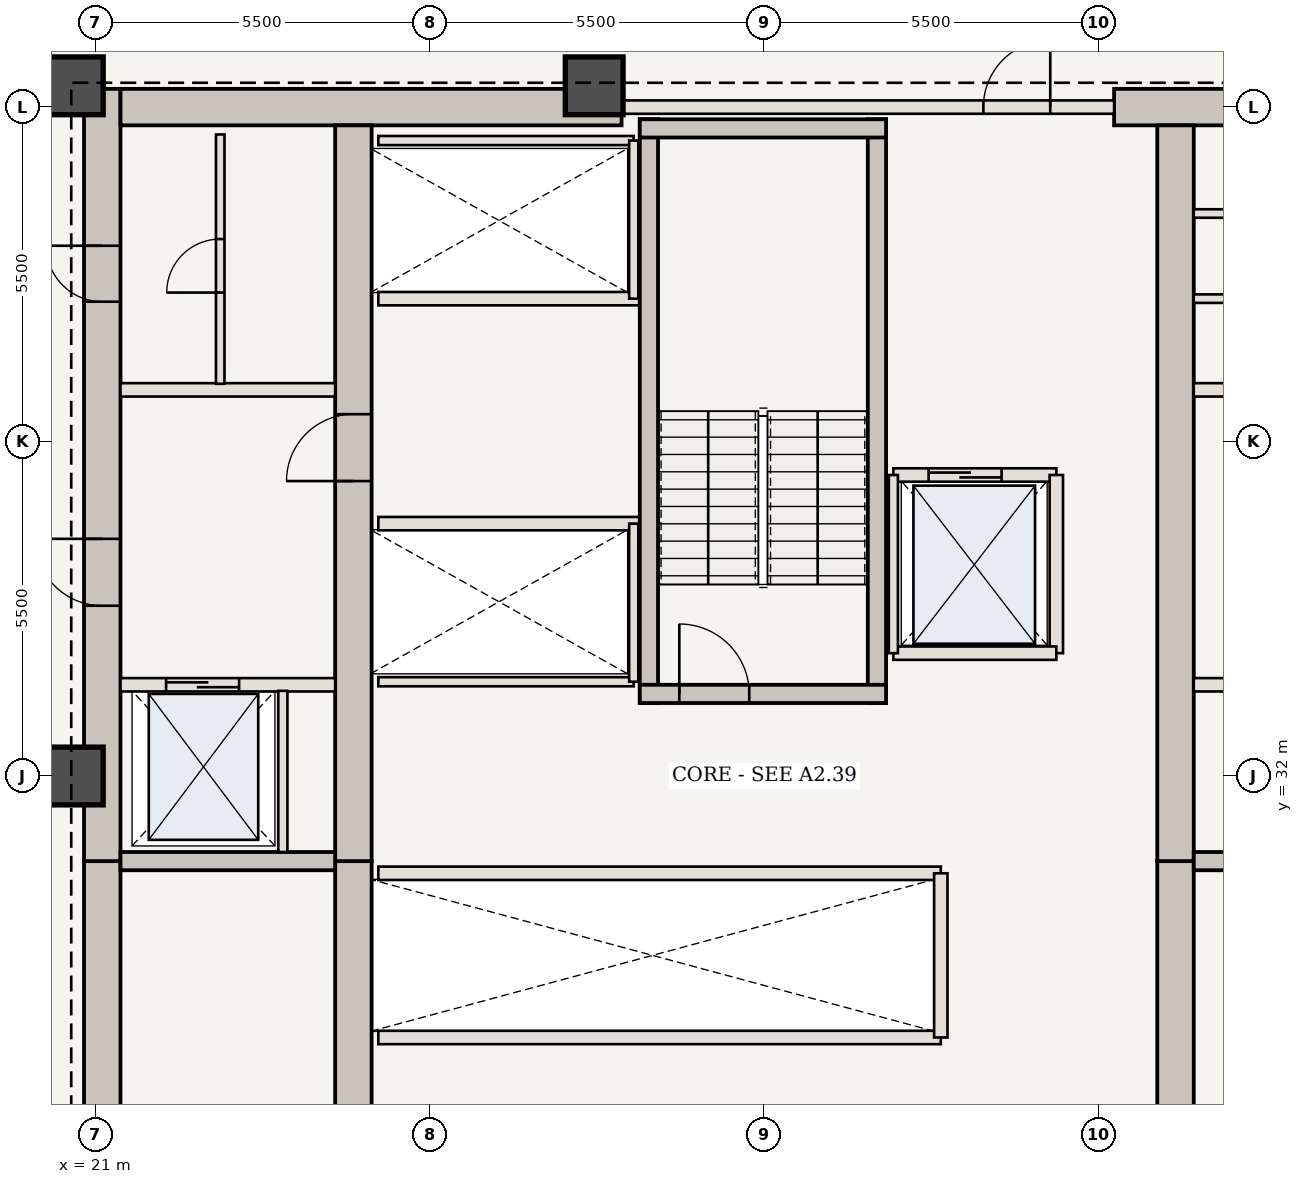
"""IFC4 building model, lengths in metres.
Left out: names, types, materials, properties, quantities, classifications, styles, units other than length and angle.
Written with IfcOpenShell. Run it as: python <this file> out.ifc"""

import sys

from ifc_helpers import new_model, si_unit, direction, frame, frame_2d, origin, origin_2d, place, context, subcontext, project, spatial, rectangle, extrude, element, fill, save


model = new_model("IFC4")
c1 = context("Model", 3, precision=1e-05, world=origin(), true_north=direction((0.0, 1.0)))
c2 = subcontext(c1, "Body", "Model", "MODEL_VIEW")
j1 = project(units=[si_unit("LENGTHUNIT", "METRE"), si_unit("PLANEANGLEUNIT", "RADIAN")], contexts=[c1])
p1 = place(None, origin())
s1 = spatial("IfcSite", under=j1, at=p1, CompositionType="ELEMENT")
p2 = place(p1, origin())
s2 = spatial("IfcBuilding", under=s1, at=p2, CompositionType="ELEMENT")
p3 = place(p2, frame((0.0, 0.0, 172.2)))
s3 = spatial("IfcBuildingStorey", under=s2, at=p3, CompositionType="ELEMENT", Elevation=172.2)
p4 = place(p3, frame((21.11, 20.65, 0.0), z_axis=(0.0, 0.0, 1.0), x_axis=(0.0, 1.0, 0.0)))
e1 = element("IfcWall", 1, at=p4, inside=s3, PredefinedType="SHEAR", context=c2, shape_type="SweptSolid", body=[
    extrude(rectangle(XDim=9.95, YDim=0.6, at=frame_2d((4.975, 0.0))), origin(), (0.0, 0.0, 1.0), 3.85),
])
p5 = place(p4, frame((1.1, 0.0, 0.0)))
e2 = element("IfcOpeningElement", 2, at=p5, cuts=e1, PredefinedType="OPENING", context=c2, shape_type="SweptSolid", body=[
    extrude(rectangle(XDim=1.15, YDim=2.15, at=frame_2d((0.575, 1.075))), frame((0.0, 0.31, 0.0), z_axis=(0.0, -1.0, 0.0), x_axis=(1.0, 0.0, 0.0)), (0.0, 0.0, 1.0), 0.62),
])
p6 = place(p3, frame((21.11, 30.6, 0.0), z_axis=(0.0, 0.0, 1.0), x_axis=(0.0, 1.0, 0.0)))
e3 = element("IfcWall", 3, at=p6, inside=s3, PredefinedType="SHEAR", context=c2, shape_type="SweptSolid", body=[
    extrude(rectangle(XDim=12.7, YDim=0.6, at=frame_2d((6.35, 0.0))), origin(), (0.0, 0.0, 1.0), 3.85),
])
p7 = place(p6, frame((4.2, 0.0, 0.0)))
e4 = element("IfcOpeningElement", 4, at=p7, cuts=e3, PredefinedType="OPENING", context=c2, shape_type="SweptSolid", body=[
    extrude(rectangle(XDim=1.1, YDim=2.15, at=frame_2d((0.55, 1.075))), frame((0.0, 0.31, 0.0), z_axis=(0.0, -1.0, 0.0), x_axis=(1.0, 0.0, 0.0)), (0.0, 0.0, 1.0), 0.62),
])
p8 = place(p6, frame((9.2, 0.0, 0.0)))
e5 = element("IfcOpeningElement", 5, at=p8, cuts=e3, PredefinedType="OPENING", context=c2, shape_type="SweptSolid", body=[
    extrude(rectangle(XDim=0.92, YDim=2.1, at=frame_2d((0.46, 1.05))), frame((0.0, 0.31, 0.0), z_axis=(0.0, -1.0, 0.0), x_axis=(1.0, 0.0, 0.0)), (0.0, 0.0, 1.0), 0.62),
])
p9 = place(p3, frame((21.41, 43.0, 0.0), z_axis=(0.0, 0.0, 1.0), x_axis=(1.0, 0.0, 0.0)))
e6 = element("IfcWall", 6, at=p9, inside=s3, PredefinedType="SHEAR", context=c2, shape_type="SweptSolid", body=[
    extrude(rectangle(XDim=8.24, YDim=0.6, at=frame_2d((4.12, 0.0))), origin(), (0.0, 0.0, 1.0), 3.85),
])
p10 = place(p3, frame((37.75, 43.0, 0.0), z_axis=(0.0, 0.0, 1.0), x_axis=(1.0, 0.0, 0.0)))
e7 = element("IfcWall", 7, at=p10, inside=s3, PredefinedType="SHEAR", context=c2, shape_type="SweptSolid", body=[
    extrude(rectangle(XDim=4.84, YDim=0.6, at=frame_2d((2.42, 0.0))), origin(), (0.0, 0.0, 1.0), 3.85),
])
p11 = place(p3, frame((25.24, 21.25, 0.0), z_axis=(0.0, 0.0, 1.0), x_axis=(0.0, 1.0, 0.0)))
e8 = element("IfcWall", 8, at=p11, inside=s3, PredefinedType="SHEAR", context=c2, shape_type="SweptSolid", body=[
    extrude(rectangle(XDim=9.35, YDim=0.6, at=frame_2d((4.675, 0.0))), origin(), (0.0, 0.0, 1.0), 3.85),
])
p12 = place(p3, frame((25.24, 30.6, 0.0), z_axis=(0.0, 0.0, 1.0), x_axis=(0.0, 1.0, 0.0)))
e9 = element("IfcWall", 9, at=p12, inside=s3, PredefinedType="SHEAR", context=c2, shape_type="SweptSolid", body=[
    extrude(rectangle(XDim=12.1, YDim=0.6, at=frame_2d((6.05, 0.0))), origin(), (0.0, 0.0, 1.0), 3.85),
])
p13 = place(p12, frame((6.25, 0.0, 0.0)))
e10 = element("IfcOpeningElement", 10, at=p13, cuts=e9, PredefinedType="OPENING", context=c2, shape_type="SweptSolid", body=[
    extrude(rectangle(XDim=1.1, YDim=2.15, at=frame_2d((0.55, 1.075))), frame((0.0, 0.31, 0.0), z_axis=(0.0, -1.0, 0.0), x_axis=(1.0, 0.0, 0.0)), (0.0, 0.0, 1.0), 0.62),
])
p14 = place(p3, frame((38.76, 21.25, 0.0), z_axis=(0.0, 0.0, 1.0), x_axis=(0.0, 1.0, 0.0)))
e11 = element("IfcWall", 11, at=p14, inside=s3, PredefinedType="SHEAR", context=c2, shape_type="SweptSolid", body=[
    extrude(rectangle(XDim=9.35, YDim=0.6, at=frame_2d((4.675, 0.0))), origin(), (0.0, 0.0, 1.0), 3.85),
])
p15 = place(p3, frame((38.76, 30.6, 0.0), z_axis=(0.0, 0.0, 1.0), x_axis=(0.0, 1.0, 0.0)))
e12 = element("IfcWall", 12, at=p15, inside=s3, PredefinedType="SHEAR", context=c2, shape_type="SweptSolid", body=[
    extrude(rectangle(XDim=12.1, YDim=0.6, at=frame_2d((6.05, 0.0))), origin(), (0.0, 0.0, 1.0), 3.85),
])
for number, where, z_axis, x_axis in (
    (13, (29.2, 43.35, 0.0), (0.0, 0.0, 1.0), (1.0, 0.0, 0.0)),
    (14, (20.65, 43.35, 0.0), (0.0, 0.0, 1.0), (1.0, 0.0, 0.0)),
    (15, (20.65, 32.0, 0.0), (0.0, 0.0, 1.0), (1.0, 0.0, 0.0)),
):
    element("IfcColumn", number, at=place(p3, frame(where, z_axis=z_axis, x_axis=x_axis)), inside=s3, PredefinedType="COLUMN", context=c2, shape_type="SweptSolid", body=[
        extrude(rectangle(XDim=0.95, YDim=0.95, at=origin_2d()), origin(), (0.0, 0.0, 1.0), 3.85),
    ])
for number, where, z_axis, x_axis in (
    (16, (21.41, 30.6, 0.0), (0.0, 0.0, 1.0), (1.0, 0.0, 0.0)),
    (17, (39.06, 30.6, 0.0), (0.0, 0.0, 1.0), (1.0, 0.0, 0.0)),
):
    element("IfcWall", number, at=place(p3, frame(where, z_axis=z_axis, x_axis=x_axis)), inside=s3, PredefinedType="SHEAR", context=c2, shape_type="SweptSolid", body=[
        extrude(rectangle(XDim=3.53, YDim=0.3, at=frame_2d((1.765, 0.0))), origin(), (0.0, 0.0, 1.0), 3.43),
    ])
p16 = place(p3, frame((21.41, 33.5, 0.0), z_axis=(0.0, 0.0, 1.0), x_axis=(1.0, 0.0, 0.0)))
e18 = element("IfcWall", 18, at=p16, inside=s3, PredefinedType="STANDARD", context=c2, shape_type="SweptSolid", body=[
    extrude(rectangle(XDim=3.53, YDim=0.22, at=frame_2d((1.765, 0.0))), origin(), (0.0, 0.0, 1.0), 3.43),
])
p17 = place(p16, frame((0.75, 0.0, 0.0)))
e19 = element("IfcOpeningElement", 19, at=p17, cuts=e18, PredefinedType="OPENING", context=c2, shape_type="SweptSolid", body=[
    extrude(rectangle(XDim=1.2, YDim=2.2, at=frame_2d((0.6, 1.1))), frame((0.0, 0.12, 0.0), z_axis=(0.0, -1.0, 0.0), x_axis=(1.0, 0.0, 0.0)), (0.0, 0.0, 1.0), 0.24),
])
p18 = place(p3, frame((24.08, 30.75, 0.0), z_axis=(0.0, 0.0, 1.0), x_axis=(0.0, 1.0, 0.0)))
e20 = element("IfcWall", 20, at=p18, inside=s3, PredefinedType="STANDARD", context=c2, shape_type="SweptSolid", body=[
    extrude(rectangle(XDim=2.65, YDim=0.15, at=frame_2d((1.325, 0.0))), origin(), (0.0, 0.0, 1.0), 3.43),
])
p19 = place(p3, frame((39.06, 33.5, 0.0), z_axis=(0.0, 0.0, 1.0), x_axis=(1.0, 0.0, 0.0)))
e21 = element("IfcWall", 21, at=p19, inside=s3, PredefinedType="STANDARD", context=c2, shape_type="SweptSolid", body=[
    extrude(rectangle(XDim=3.53, YDim=0.22, at=frame_2d((1.765, 0.0))), origin(), (0.0, 0.0, 1.0), 3.43),
])
p20 = place(p19, frame((1.55, 0.0, 0.0)))
e22 = element("IfcOpeningElement", 22, at=p20, cuts=e21, PredefinedType="OPENING", context=c2, shape_type="SweptSolid", body=[
    extrude(rectangle(XDim=1.2, YDim=2.2, at=frame_2d((0.6, 1.1))), frame((0.0, 0.12, 0.0), z_axis=(0.0, -1.0, 0.0), x_axis=(1.0, 0.0, 0.0)), (0.0, 0.0, 1.0), 0.24),
])
for number, where, z_axis, x_axis in (
    (23, (21.41, 38.35, 0.0), (0.0, 0.0, 1.0), (1.0, 0.0, 0.0)),
    (24, (39.06, 38.35, 0.0), (0.0, 0.0, 1.0), (1.0, 0.0, 0.0)),
):
    element("IfcWall", number, at=place(p3, frame(where, z_axis=z_axis, x_axis=x_axis)), inside=s3, PredefinedType="STANDARD", context=c2, shape_type="SweptSolid", body=[
        extrude(rectangle(XDim=3.53, YDim=0.22, at=frame_2d((1.765, 0.0))), origin(), (0.0, 0.0, 1.0), 3.43),
    ])
p21 = place(p3, frame((23.05, 38.45, 0.0), z_axis=(0.0, 0.0, 1.0), x_axis=(0.0, 1.0, 0.0)))
e25 = element("IfcWall", 25, at=p21, inside=s3, PredefinedType="STANDARD", context=c2, shape_type="SweptSolid", body=[
    extrude(rectangle(XDim=4.1, YDim=0.14, at=frame_2d((2.05, 0.0))), origin(), (0.0, 0.0, 1.0), 3.43),
])
p22 = place(p21, frame((1.5, 0.0, 0.0)))
e26 = element("IfcOpeningElement", 26, at=p22, cuts=e25, PredefinedType="OPENING", context=c2, shape_type="SweptSolid", body=[
    extrude(rectangle(XDim=0.88, YDim=2.1, at=frame_2d((0.44, 1.05))), frame((0.0, 0.08, 0.0), z_axis=(0.0, -1.0, 0.0), x_axis=(1.0, 0.0, 0.0)), (0.0, 0.0, 1.0), 0.16),
])
for number, where, z_axis, x_axis in (
    (27, (39.06, 39.85, 0.0), (0.0, 0.0, 1.0), (1.0, 0.0, 0.0)),
    (28, (39.06, 41.25, 0.0), (0.0, 0.0, 1.0), (1.0, 0.0, 0.0)),
):
    element("IfcWall", number, at=place(p3, frame(where, z_axis=z_axis, x_axis=x_axis)), inside=s3, PredefinedType="STANDARD", context=c2, shape_type="SweptSolid", body=[
        extrude(rectangle(XDim=3.53, YDim=0.14, at=frame_2d((1.765, 0.0))), origin(), (0.0, 0.0, 1.0), 3.43),
    ])
for number, where, z_axis, x_axis in (
    (29, (25.65, 27.7, 0.0), (0.0, 0.0, 1.0), (1.0, 0.0, 0.0)),
    (30, (25.65, 30.4, 0.0), (0.0, 0.0, 1.0), (1.0, 0.0, 0.0)),
):
    element("IfcWall", number, at=place(p3, frame(where, z_axis=z_axis, x_axis=x_axis)), inside=s3, PredefinedType="STANDARD", context=c2, shape_type="SweptSolid", body=[
        extrude(rectangle(XDim=9.25, YDim=0.22, at=frame_2d((4.625, 0.0))), origin(), (0.0, 0.0, 1.0), 3.43),
    ])
p23 = place(p3, frame((34.9, 27.7, 0.0), z_axis=(0.0, 0.0, 1.0), x_axis=(0.0, 1.0, 0.0)))
e31 = element("IfcWall", 31, at=p23, inside=s3, PredefinedType="STANDARD", context=c2, shape_type="SweptSolid", body=[
    extrude(rectangle(XDim=2.7, YDim=0.22, at=frame_2d((1.35, 0.0))), origin(), (0.0, 0.0, 1.0), 3.43),
])
p24 = place(p3, frame((25.65, 36.15, 0.0), z_axis=(0.0, 0.0, 1.0), x_axis=(1.0, 0.0, 0.0)))
e32 = element("IfcWall", 32, at=p24, inside=s3, PredefinedType="STANDARD", context=c2, shape_type="SweptSolid", body=[
    extrude(rectangle(XDim=4.3, YDim=0.22, at=frame_2d((2.15, 0.0))), origin(), (0.0, 0.0, 1.0), 3.43),
])
p25 = place(p3, frame((25.65, 33.55, 0.0), z_axis=(0.0, 0.0, 1.0), x_axis=(1.0, 0.0, 0.0)))
e33 = element("IfcWall", 33, at=p25, inside=s3, PredefinedType="STANDARD", context=c2, shape_type="SweptSolid", body=[
    extrude(rectangle(XDim=4.2, YDim=0.15, at=frame_2d((2.1, 0.0))), origin(), (0.0, 0.0, 1.0), 3.43),
])
p26 = place(p3, frame((29.85, 33.55, 0.0), z_axis=(0.0, 0.0, 1.0), x_axis=(0.0, 1.0, 0.0)))
e34 = element("IfcWall", 34, at=p26, inside=s3, PredefinedType="STANDARD", context=c2, shape_type="SweptSolid", body=[
    extrude(rectangle(XDim=2.6, YDim=0.15, at=frame_2d((1.3, 0.0))), origin(), (0.0, 0.0, 1.0), 3.43),
])
p27 = place(p3, frame((25.65, 39.85, 0.0), z_axis=(0.0, 0.0, 1.0), x_axis=(1.0, 0.0, 0.0)))
e35 = element("IfcWall", 35, at=p27, inside=s3, PredefinedType="STANDARD", context=c2, shape_type="SweptSolid", body=[
    extrude(rectangle(XDim=4.3, YDim=0.22, at=frame_2d((2.15, 0.0))), origin(), (0.0, 0.0, 1.0), 3.43),
])
p28 = place(p3, frame((25.65, 42.45, 0.0), z_axis=(0.0, 0.0, 1.0), x_axis=(1.0, 0.0, 0.0)))
e36 = element("IfcWall", 36, at=p28, inside=s3, PredefinedType="STANDARD", context=c2, shape_type="SweptSolid", body=[
    extrude(rectangle(XDim=4.2, YDim=0.15, at=frame_2d((2.1, 0.0))), origin(), (0.0, 0.0, 1.0), 3.43),
])
p29 = place(p3, frame((29.85, 39.85, 0.0), z_axis=(0.0, 0.0, 1.0), x_axis=(0.0, 1.0, 0.0)))
e37 = element("IfcWall", 37, at=p29, inside=s3, PredefinedType="STANDARD", context=c2, shape_type="SweptSolid", body=[
    extrude(rectangle(XDim=2.6, YDim=0.15, at=frame_2d((1.3, 0.0))), origin(), (0.0, 0.0, 1.0), 3.43),
])
for number, where, z_axis, x_axis in (
    (38, (30.1, 33.2, 0.0), (0.0, 0.0, 1.0), (0.0, 1.0, 0.0)),
    (39, (33.85, 33.2, 0.0), (0.0, 0.0, 1.0), (0.0, 1.0, 0.0)),
):
    element("IfcWall", number, at=place(p3, frame(where, z_axis=z_axis, x_axis=x_axis)), inside=s3, PredefinedType="SHEAR", context=c2, shape_type="SweptSolid", body=[
        extrude(rectangle(XDim=9.6, YDim=0.3, at=frame_2d((4.8, 0.0))), origin(), (0.0, 0.0, 1.0), 3.43),
    ])
p30 = place(p3, frame((29.95, 33.35, 0.0), z_axis=(0.0, 0.0, 1.0), x_axis=(1.0, 0.0, 0.0)))
e40 = element("IfcWall", 40, at=p30, inside=s3, PredefinedType="SHEAR", context=c2, shape_type="SweptSolid", body=[
    extrude(rectangle(XDim=4.05, YDim=0.3, at=frame_2d((2.025, 0.0))), origin(), (0.0, 0.0, 1.0), 3.43),
])
p31 = place(p30, frame((0.65, 0.0, 0.0)))
e41 = element("IfcOpeningElement", 41, at=p31, cuts=e40, PredefinedType="OPENING", context=c2, shape_type="SweptSolid", body=[
    extrude(rectangle(XDim=1.15, YDim=2.15, at=frame_2d((0.575, 1.075))), frame((0.0, 0.16, 0.0), z_axis=(0.0, -1.0, 0.0), x_axis=(1.0, 0.0, 0.0)), (0.0, 0.0, 1.0), 0.32),
])
p32 = place(p3, frame((29.95, 42.65, 0.0), z_axis=(0.0, 0.0, 1.0), x_axis=(1.0, 0.0, 0.0)))
e42 = element("IfcWall", 42, at=p32, inside=s3, PredefinedType="SHEAR", context=c2, shape_type="SweptSolid", body=[
    extrude(rectangle(XDim=4.05, YDim=0.3, at=frame_2d((2.025, 0.0))), origin(), (0.0, 0.0, 1.0), 3.43),
])
p33 = place(p3, frame((29.65, 43.0, 0.0), z_axis=(0.0, 0.0, 1.0), x_axis=(1.0, 0.0, 0.0)))
e43 = element("IfcWall", 43, at=p33, inside=s3, PredefinedType="STANDARD", context=c2, shape_type="SweptSolid", body=[
    extrude(rectangle(XDim=8.1, YDim=0.22, at=frame_2d((4.05, 0.0))), origin(), (0.0, 0.0, 1.0), 3.43),
])
p34 = place(p33, frame((5.95, 0.0, 0.0)))
e44 = element("IfcOpeningElement", 44, at=p34, cuts=e43, PredefinedType="OPENING", context=c2, shape_type="SweptSolid", body=[
    extrude(rectangle(XDim=1.1, YDim=2.15, at=frame_2d((0.55, 1.075))), frame((0.0, 0.12, 0.0), z_axis=(0.0, -1.0, 0.0), x_axis=(1.0, 0.0, 0.0)), (0.0, 0.0, 1.0), 0.24),
])
p35 = place(p3, frame((34.12, 36.95, 0.0), z_axis=(0.0, 0.0, 1.0), x_axis=(1.0, 0.0, 0.0)))
e45 = element("IfcWall", 45, at=p35, inside=s3, PredefinedType="STANDARD", context=c2, shape_type="SweptSolid", body=[
    extrude(rectangle(XDim=2.68, YDim=0.22, at=frame_2d((1.34, 0.0))), origin(), (0.0, 0.0, 1.0), 3.43),
])
p36 = place(p35, frame((0.58, 0.0, 0.0)))
e46 = element("IfcOpeningElement", 46, at=p36, cuts=e45, PredefinedType="OPENING", context=c2, shape_type="SweptSolid", body=[
    extrude(rectangle(XDim=1.2, YDim=2.2, at=frame_2d((0.6, 1.1))), frame((0.0, 0.12, 0.0), z_axis=(0.0, -1.0, 0.0), x_axis=(1.0, 0.0, 0.0)), (0.0, 0.0, 1.0), 0.24),
])
p37 = place(p3, frame((36.8, 34.02, 0.0), z_axis=(0.0, 0.0, 1.0), x_axis=(0.0, 1.0, 0.0)))
e47 = element("IfcWall", 47, at=p37, inside=s3, PredefinedType="STANDARD", context=c2, shape_type="SweptSolid", body=[
    extrude(rectangle(XDim=2.93, YDim=0.22, at=frame_2d((1.465, 0.0))), origin(), (0.0, 0.0, 1.0), 3.43),
])
p38 = place(p3, frame((34.12, 34.02, 0.0), z_axis=(0.0, 0.0, 1.0), x_axis=(1.0, 0.0, 0.0)))
e48 = element("IfcWall", 48, at=p38, inside=s3, PredefinedType="STANDARD", context=c2, shape_type="SweptSolid", body=[
    extrude(rectangle(XDim=2.68, YDim=0.22, at=frame_2d((1.34, 0.0))), origin(), (0.0, 0.0, 1.0), 3.43),
])
p39 = place(p3, frame((34.12, 34.02, 0.0), z_axis=(0.0, 0.0, 1.0), x_axis=(0.0, 1.0, 0.0)))
e49 = element("IfcWall", 49, at=p39, inside=s3, PredefinedType="STANDARD", context=c2, shape_type="SweptSolid", body=[
    extrude(rectangle(XDim=2.93, YDim=0.15, at=frame_2d((1.465, 0.0))), origin(), (0.0, 0.0, 1.0), 3.43),
])
p40 = place(p7, origin())
e50 = element("IfcDoor", 50, at=p40, inside=s3, OperationType="SINGLE_SWING_RIGHT", PredefinedType="DOOR", context=c2, shape_type="SweptSolid", body=[
    extrude(rectangle(XDim=1.1, YDim=2.15, at=frame_2d((0.55, 1.075))), frame((0.0, 0.025, 0.0), z_axis=(0.0, -1.0, 0.0), x_axis=(1.0, 0.0, 0.0)), (0.0, 0.0, 1.0), 0.05),
])
fill(e4, e50)
p41 = place(p13, origin())
e51 = element("IfcDoor", 51, at=p41, inside=s3, OperationType="SINGLE_SWING_LEFT", PredefinedType="DOOR", context=c2, shape_type="SweptSolid", body=[
    extrude(rectangle(XDim=1.1, YDim=2.15, at=frame_2d((0.55, 1.075))), frame((0.0, 0.025, 0.0), z_axis=(0.0, -1.0, 0.0), x_axis=(1.0, 0.0, 0.0)), (0.0, 0.0, 1.0), 0.05),
])
fill(e10, e51)
p42 = place(p8, origin())
e52 = element("IfcDoor", 52, at=p42, inside=s3, OperationType="SINGLE_SWING_RIGHT", PredefinedType="DOOR", context=c2, shape_type="SweptSolid", body=[
    extrude(rectangle(XDim=0.92, YDim=2.1, at=frame_2d((0.46, 1.05))), frame((0.0, 0.025, 0.0), z_axis=(0.0, -1.0, 0.0), x_axis=(1.0, 0.0, 0.0)), (0.0, 0.0, 1.0), 0.05),
])
fill(e5, e52)
p43 = place(p17, origin())
e53 = element("IfcDoor", 53, at=p43, inside=s3, OperationType="DOUBLE_DOOR_SLIDING", PredefinedType="DOOR", context=c2, shape_type="SweptSolid", body=[
    extrude(rectangle(XDim=1.2, YDim=2.2, at=frame_2d((0.6, 1.1))), frame((0.0, 0.025, 0.0), z_axis=(0.0, -1.0, 0.0), x_axis=(1.0, 0.0, 0.0)), (0.0, 0.0, 1.0), 0.05),
])
fill(e19, e53)
p44 = place(p22, origin())
e54 = element("IfcDoor", 54, at=p44, inside=s3, OperationType="SINGLE_SWING_LEFT", PredefinedType="DOOR", context=c2, shape_type="SweptSolid", body=[
    extrude(rectangle(XDim=0.88, YDim=2.1, at=frame_2d((0.44, 1.05))), frame((0.0, 0.025, 0.0), z_axis=(0.0, -1.0, 0.0), x_axis=(1.0, 0.0, 0.0)), (0.0, 0.0, 1.0), 0.05),
])
fill(e26, e54)
p45 = place(p31, origin())
e55 = element("IfcDoor", 55, at=p45, inside=s3, OperationType="SINGLE_SWING_LEFT", PredefinedType="DOOR", context=c2, shape_type="SweptSolid", body=[
    extrude(rectangle(XDim=1.15, YDim=2.15, at=frame_2d((0.575, 1.075))), frame((0.0, 0.025, 0.0), z_axis=(0.0, -1.0, 0.0), x_axis=(1.0, 0.0, 0.0)), (0.0, 0.0, 1.0), 0.05),
])
fill(e41, e55)
p46 = place(p34, origin())
e56 = element("IfcDoor", 56, at=p46, inside=s3, OperationType="SINGLE_SWING_RIGHT", PredefinedType="DOOR", context=c2, shape_type="SweptSolid", body=[
    extrude(rectangle(XDim=1.1, YDim=2.15, at=frame_2d((0.55, 1.075))), frame((0.0, 0.025, 0.0), z_axis=(0.0, -1.0, 0.0), x_axis=(1.0, 0.0, 0.0)), (0.0, 0.0, 1.0), 0.05),
])
fill(e44, e56)
p47 = place(p36, origin())
e57 = element("IfcDoor", 57, at=p47, inside=s3, OperationType="DOUBLE_DOOR_SLIDING", PredefinedType="DOOR", context=c2, shape_type="SweptSolid", body=[
    extrude(rectangle(XDim=1.2, YDim=2.2, at=frame_2d((0.6, 1.1))), frame((0.0, 0.025, 0.0), z_axis=(0.0, -1.0, 0.0), x_axis=(1.0, 0.0, 0.0)), (0.0, 0.0, 1.0), 0.05),
])
fill(e46, e57)
save(model, sys.argv[1])
